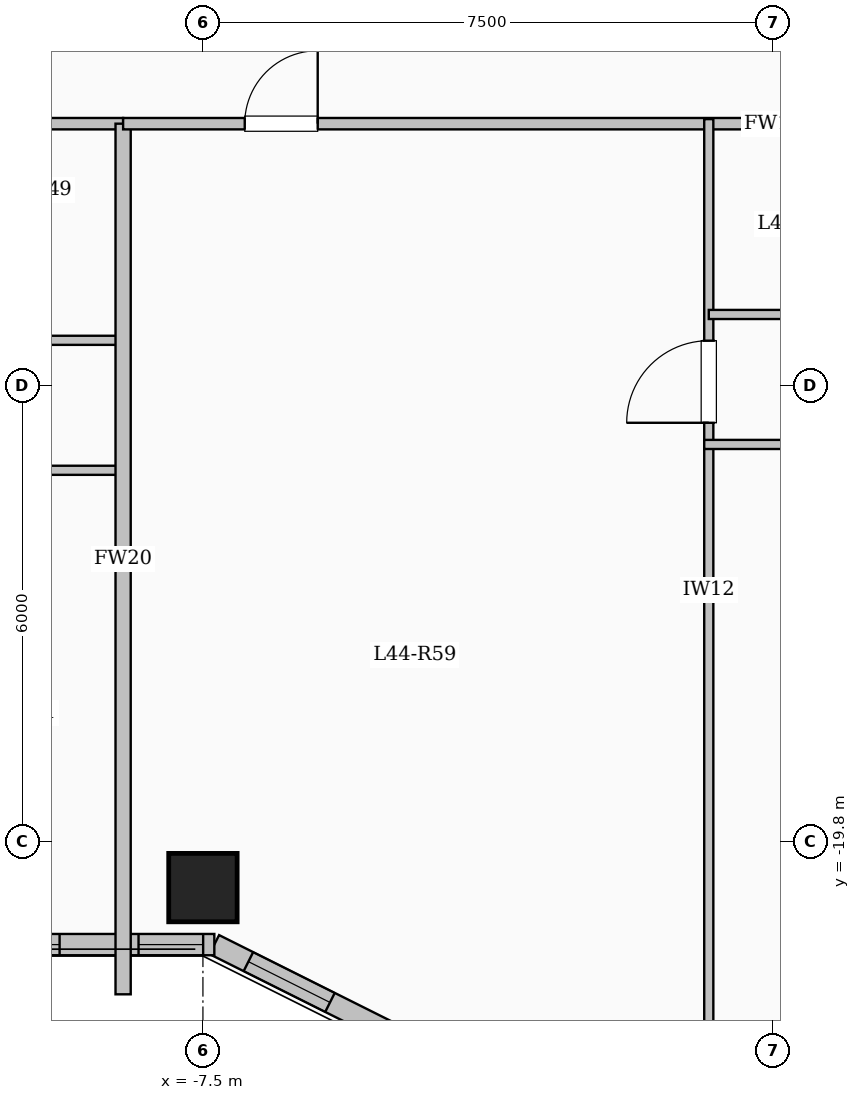
"""IFC4 building model, lengths in metres.
Left out: names, types, materials, properties, quantities, classifications, styles, units other than length and angle.
Written with IfcOpenShell. Run it as: python <this file> out.ifc"""

import sys

from ifc_helpers import new_model, si_unit, direction, frame, frame_2d, origin, origin_2d, place, context, subcontext, project, spatial, rectangle, extrude, element, fill, save


model = new_model("IFC4")
c1 = context("Model", 3, precision=1e-05, world=origin(), true_north=direction((0.0, 1.0)))
c2 = subcontext(c1, "Body", "Model", "MODEL_VIEW")
j1 = project(units=[si_unit("LENGTHUNIT", "METRE"), si_unit("PLANEANGLEUNIT", "RADIAN")], contexts=[c1])
p1 = place(None, origin())
s1 = spatial("IfcSite", under=j1, at=p1, CompositionType="ELEMENT")
p2 = place(p1, origin())
s2 = spatial("IfcBuilding", under=s1, at=p2, CompositionType="ELEMENT")
p3 = place(p2, frame((0.0, 0.0, 162.75)))
s3 = spatial("IfcBuildingStorey", under=s2, at=p3, CompositionType="ELEMENT", Elevation=162.75)
p4 = place(p3, frame((-7.5, -20.4, 0.0), z_axis=(0.0, 0.0, 1.0), x_axis=(1.0, 0.0, 0.0)))
e1 = element("IfcColumn", 1, at=p4, inside=s3, PredefinedType="COLUMN", context=c2, shape_type="SweptSolid", body=[
    extrude(rectangle(XDim=0.9, YDim=0.9, at=origin_2d()), origin(), (0.0, 0.0, 1.0), 3.35),
])
p5 = place(p3, frame((-4.35, -22.65, 0.0), z_axis=(0.0, 0.0, 1.0), x_axis=(-0.894427191, 0.4472135955, 0.0)))
e2 = element("IfcWall", 2, at=p5, inside=s3, PredefinedType="SOLIDWALL", context=c2, shape_type="SweptSolid", body=[
    extrude(rectangle(XDim=3.354, YDim=0.28, at=frame_2d((1.677, 0.0))), origin(), (0.0, 0.0, 1.0), 3.1),
])
p6 = place(p5, frame((1.653, 0.0, 0.95)))
e3 = element("IfcOpeningElement", 3, at=p6, cuts=e2, PredefinedType="OPENING", context=c2, shape_type="SweptSolid", body=[
    extrude(rectangle(XDim=1.2, YDim=1.5, at=frame_2d((0.6, 0.75))), frame((0.0, 0.15, 0.0), z_axis=(0.0, -1.0, 0.0), x_axis=(1.0, 0.0, 0.0)), (0.0, 0.0, 1.0), 0.3),
])
p7 = place(p3, frame((-7.35, -21.15, 0.0), z_axis=(0.0, 0.0, 1.0), x_axis=(-1.0, 0.0, 0.0)))
e4 = element("IfcWall", 4, at=p7, inside=s3, PredefinedType="SOLIDWALL", context=c2, shape_type="SweptSolid", body=[
    extrude(rectangle(XDim=12.3, YDim=0.28, at=frame_2d((6.15, 0.0))), origin(), (0.0, 0.0, 1.0), 3.1),
])
p8 = place(p7, frame((0.147, 0.0, 0.95)))
e5 = element("IfcOpeningElement", 5, at=p8, cuts=e4, PredefinedType="OPENING", context=c2, shape_type="SweptSolid", body=[
    extrude(rectangle(XDim=0.85, YDim=1.5, at=frame_2d((0.425, 0.75))), frame((0.0, 0.15, 0.0), z_axis=(0.0, -1.0, 0.0), x_axis=(1.0, 0.0, 0.0)), (0.0, 0.0, 1.0), 0.3),
])
p9 = place(p7, frame((2.036, 0.0, 0.95)))
e6 = element("IfcOpeningElement", 6, at=p9, cuts=e4, PredefinedType="OPENING", context=c2, shape_type="SweptSolid", body=[
    extrude(rectangle(XDim=1.2, YDim=1.5, at=frame_2d((0.6, 0.75))), frame((0.0, 0.15, 0.0), z_axis=(0.0, -1.0, 0.0), x_axis=(1.0, 0.0, 0.0)), (0.0, 0.0, 1.0), 0.3),
])
p10 = place(p7, frame((4.772, 0.0, 0.95)))
e7 = element("IfcOpeningElement", 7, at=p10, cuts=e4, PredefinedType="OPENING", context=c2, shape_type="SweptSolid", body=[
    extrude(rectangle(XDim=1.2, YDim=1.5, at=frame_2d((0.6, 0.75))), frame((0.0, 0.15, 0.0), z_axis=(0.0, -1.0, 0.0), x_axis=(1.0, 0.0, 0.0)), (0.0, 0.0, 1.0), 0.3),
])
p11 = place(p7, frame((8.364, 0.0, 0.9)))
e8 = element("IfcOpeningElement", 8, at=p11, cuts=e4, PredefinedType="OPENING", context=c2, shape_type="SweptSolid", body=[
    extrude(rectangle(XDim=2.2, YDim=1.75, at=frame_2d((1.1, 0.875))), frame((0.0, 0.15, 0.0), z_axis=(0.0, -1.0, 0.0), x_axis=(1.0, 0.0, 0.0)), (0.0, 0.0, 1.0), 0.3),
])
p12 = place(p3, frame((-19.55, -10.35, 0.0), z_axis=(0.0, 0.0, 1.0), x_axis=(1.0, 0.0, 0.0)))
e9 = element("IfcWall", 9, at=p12, inside=s3, PredefinedType="PARTITIONING", context=c2, shape_type="SweptSolid", body=[
    extrude(rectangle(XDim=11.0, YDim=0.15, at=frame_2d((5.5, 0.0))), origin(), (0.0, 0.0, 1.0), 3.1),
])
p13 = place(p12, frame((0.7, 0.0, 0.0)))
e10 = element("IfcOpeningElement", 10, at=p13, cuts=e9, PredefinedType="OPENING", context=c2, shape_type="SweptSolid", body=[
    extrude(rectangle(XDim=0.96, YDim=2.15, at=frame_2d((0.48, 1.075))), frame((0.0, 0.085, 0.0), z_axis=(0.0, -1.0, 0.0), x_axis=(1.0, 0.0, 0.0)), (0.0, 0.0, 1.0), 0.17),
])
p14 = place(p3, frame((-11.422, -13.2, 0.0), z_axis=(0.0, 0.0, 1.0), x_axis=(1.0, 0.0, 0.0)))
e11 = element("IfcWall", 11, at=p14, inside=s3, PredefinedType="PARTITIONING", context=c2, shape_type="SweptSolid", body=[
    extrude(rectangle(XDim=2.822, YDim=0.12, at=frame_2d((1.411, 0.0))), origin(), (0.0, 0.0, 1.0), 3.1),
])
p15 = place(p14, frame((0.971, 0.0, 0.0)))
e12 = element("IfcOpeningElement", 12, at=p15, cuts=e11, PredefinedType="OPENING", context=c2, shape_type="SweptSolid", body=[
    extrude(rectangle(XDim=0.88, YDim=2.1, at=frame_2d((0.44, 1.05))), frame((0.0, 0.07, 0.0), z_axis=(0.0, -1.0, 0.0), x_axis=(1.0, 0.0, 0.0)), (0.0, 0.0, 1.0), 0.14),
])
p16 = place(p3, frame((-14.135, -14.91, 0.0), z_axis=(0.0, 0.0, 1.0), x_axis=(1.0, 0.0, 0.0)))
e13 = element("IfcWall", 13, at=p16, inside=s3, PredefinedType="PARTITIONING", context=c2, shape_type="SweptSolid", body=[
    extrude(rectangle(XDim=5.595, YDim=0.12, at=frame_2d((2.797, 0.0))), origin(), (0.0, 0.0, 1.0), 3.1),
])
p17 = place(p16, frame((0.914, 0.0, 0.0)))
e14 = element("IfcOpeningElement", 14, at=p17, cuts=e13, PredefinedType="OPENING", context=c2, shape_type="SweptSolid", body=[
    extrude(rectangle(XDim=0.88, YDim=2.1, at=frame_2d((0.44, 1.05))), frame((0.0, 0.07, 0.0), z_axis=(0.0, -1.0, 0.0), x_axis=(1.0, 0.0, 0.0)), (0.0, 0.0, 1.0), 0.14),
])
p18 = place(p16, frame((3.621, 0.0, 0.0)))
e15 = element("IfcOpeningElement", 15, at=p18, cuts=e13, PredefinedType="OPENING", context=c2, shape_type="SweptSolid", body=[
    extrude(rectangle(XDim=0.88, YDim=2.1, at=frame_2d((0.44, 1.05))), frame((0.0, 0.07, 0.0), z_axis=(0.0, -1.0, 0.0), x_axis=(1.0, 0.0, 0.0)), (0.0, 0.0, 1.0), 0.14),
])
p19 = place(p3, frame((-8.55, -21.804, 0.0), z_axis=(0.0, 0.0, 1.0), x_axis=(0.0, 1.0, 0.0)))
e16 = element("IfcWall", 16, at=p19, inside=s3, PredefinedType="SOLIDWALL", context=c2, shape_type="SweptSolid", body=[
    extrude(rectangle(XDim=11.454, YDim=0.2, at=frame_2d((5.727, 0.0))), origin(), (0.0, 0.0, 1.0), 3.1),
])
p20 = place(p3, frame((-8.55, -10.35, 0.0), z_axis=(0.0, 0.0, 1.0), x_axis=(1.0, 0.0, 0.0)))
e17 = element("IfcWall", 17, at=p20, inside=s3, PredefinedType="PARTITIONING", context=c2, shape_type="SweptSolid", body=[
    extrude(rectangle(XDim=17.1, YDim=0.15, at=frame_2d((8.55, 0.0))), origin(), (0.0, 0.0, 1.0), 3.1),
])
p21 = place(p20, frame((1.6, 0.0, 0.0)))
e18 = element("IfcOpeningElement", 18, at=p21, cuts=e17, PredefinedType="OPENING", context=c2, shape_type="SweptSolid", body=[
    extrude(rectangle(XDim=0.96, YDim=2.15, at=frame_2d((0.48, 1.075))), frame((0.0, 0.085, 0.0), z_axis=(0.0, -1.0, 0.0), x_axis=(1.0, 0.0, 0.0)), (0.0, 0.0, 1.0), 0.17),
])
p22 = place(p3, frame((-0.845, -22.68, 0.0), z_axis=(0.0, 0.0, 1.0), x_axis=(0.0, 1.0, 0.0)))
e19 = element("IfcWall", 19, at=p22, inside=s3, PredefinedType="PARTITIONING", context=c2, shape_type="SweptSolid", body=[
    extrude(rectangle(XDim=12.39, YDim=0.12, at=frame_2d((6.195, 0.0))), origin(), (0.0, 0.0, 1.0), 3.1),
])
p23 = place(p22, frame((8.395, 0.0, 0.0)))
e20 = element("IfcOpeningElement", 20, at=p23, cuts=e19, PredefinedType="OPENING", context=c2, shape_type="SweptSolid", body=[
    extrude(rectangle(XDim=1.08, YDim=2.15, at=frame_2d((0.54, 1.075))), frame((0.0, 0.07, 0.0), z_axis=(0.0, -1.0, 0.0), x_axis=(1.0, 0.0, 0.0)), (0.0, 0.0, 1.0), 0.14),
])
p24 = place(p3, frame((-0.845, -12.86, 0.0), z_axis=(0.0, 0.0, 1.0), x_axis=(1.0, 0.0, 0.0)))
e21 = element("IfcWall", 21, at=p24, inside=s3, PredefinedType="PARTITIONING", context=c2, shape_type="SweptSolid", body=[
    extrude(rectangle(XDim=5.315, YDim=0.12, at=frame_2d((2.657, 0.0))), origin(), (0.0, 0.0, 1.0), 3.1),
])
p25 = place(p24, frame((2.217, 0.0, 0.0)))
e22 = element("IfcOpeningElement", 22, at=p25, cuts=e21, PredefinedType="OPENING", context=c2, shape_type="SweptSolid", body=[
    extrude(rectangle(XDim=0.88, YDim=2.1, at=frame_2d((0.44, 1.05))), frame((0.0, 0.07, 0.0), z_axis=(0.0, -1.0, 0.0), x_axis=(1.0, 0.0, 0.0)), (0.0, 0.0, 1.0), 0.14),
])
p26 = place(p3, frame((-0.905, -14.57, 0.0), z_axis=(0.0, 0.0, 1.0), x_axis=(1.0, 0.0, 0.0)))
e23 = element("IfcWall", 23, at=p26, inside=s3, PredefinedType="PARTITIONING", context=c2, shape_type="SweptSolid", body=[
    extrude(rectangle(XDim=9.515, YDim=0.12, at=frame_2d((4.758, 0.0))), origin(), (0.0, 0.0, 1.0), 3.1),
])
p27 = place(p26, frame((1.891, 0.0, 0.0)))
e24 = element("IfcOpeningElement", 24, at=p27, cuts=e23, PredefinedType="OPENING", context=c2, shape_type="SweptSolid", body=[
    extrude(rectangle(XDim=0.88, YDim=2.1, at=frame_2d((0.44, 1.05))), frame((0.0, 0.07, 0.0), z_axis=(0.0, -1.0, 0.0), x_axis=(1.0, 0.0, 0.0)), (0.0, 0.0, 1.0), 0.14),
])
p28 = place(p26, frame((6.554, 0.0, 0.0)))
e25 = element("IfcOpeningElement", 25, at=p28, cuts=e23, PredefinedType="OPENING", context=c2, shape_type="SweptSolid", body=[
    extrude(rectangle(XDim=0.88, YDim=2.1, at=frame_2d((0.44, 1.05))), frame((0.0, 0.07, 0.0), z_axis=(0.0, -1.0, 0.0), x_axis=(1.0, 0.0, 0.0)), (0.0, 0.0, 1.0), 0.14),
])
p29 = place(p6, origin())
e26 = element("IfcWindow", 26, at=p29, inside=s3, PartitioningType="SINGLE_PANEL", PredefinedType="WINDOW", context=c2, shape_type="SweptSolid", body=[
    extrude(rectangle(XDim=1.2, YDim=1.5, at=frame_2d((0.6, 0.75))), frame((0.0, 0.03, 0.0), z_axis=(0.0, -1.0, 0.0), x_axis=(1.0, 0.0, 0.0)), (0.0, 0.0, 1.0), 0.06),
])
fill(e3, e26)
p30 = place(p8, origin())
e27 = element("IfcWindow", 27, at=p30, inside=s3, PartitioningType="SINGLE_PANEL", PredefinedType="WINDOW", context=c2, shape_type="SweptSolid", body=[
    extrude(rectangle(XDim=0.85, YDim=1.5, at=frame_2d((0.425, 0.75))), frame((0.0, 0.03, 0.0), z_axis=(0.0, -1.0, 0.0), x_axis=(1.0, 0.0, 0.0)), (0.0, 0.0, 1.0), 0.06),
])
fill(e5, e27)
p31 = place(p9, origin())
e28 = element("IfcWindow", 28, at=p31, inside=s3, PartitioningType="SINGLE_PANEL", PredefinedType="WINDOW", context=c2, shape_type="SweptSolid", body=[
    extrude(rectangle(XDim=1.2, YDim=1.5, at=frame_2d((0.6, 0.75))), frame((0.0, 0.03, 0.0), z_axis=(0.0, -1.0, 0.0), x_axis=(1.0, 0.0, 0.0)), (0.0, 0.0, 1.0), 0.06),
])
fill(e6, e28)
p32 = place(p21, origin())
e29 = element("IfcDoor", 29, at=p32, inside=s3, OperationType="SINGLE_SWING_RIGHT", PredefinedType="DOOR", context=c2, shape_type="SweptSolid", body=[
    extrude(rectangle(XDim=0.96, YDim=2.15, at=frame_2d((0.48, 1.075))), frame((0.0, 0.025, 0.0), z_axis=(0.0, -1.0, 0.0), x_axis=(1.0, 0.0, 0.0)), (0.0, 0.0, 1.0), 0.05),
])
fill(e18, e29)
p33 = place(p23, origin())
e30 = element("IfcDoor", 30, at=p33, inside=s3, OperationType="SINGLE_SWING_LEFT", PredefinedType="DOOR", context=c2, shape_type="SweptSolid", body=[
    extrude(rectangle(XDim=1.08, YDim=2.15, at=frame_2d((0.54, 1.075))), frame((0.0, 0.025, 0.0), z_axis=(0.0, -1.0, 0.0), x_axis=(1.0, 0.0, 0.0)), (0.0, 0.0, 1.0), 0.05),
])
fill(e20, e30)
save(model, sys.argv[1])
